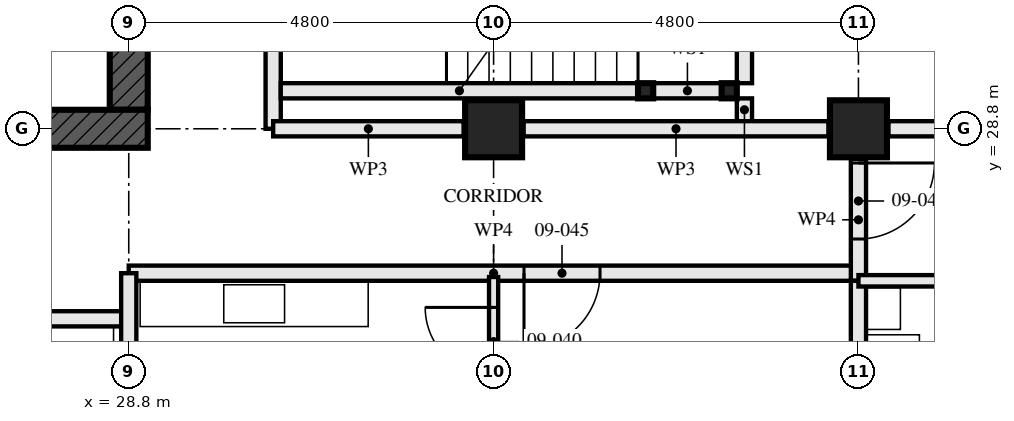
"""IFC4 building model, lengths in metres.
Left out: names, types, materials, properties, quantities, classifications, styles, units other than length and angle.
Written with IfcOpenShell. Run it as: python <this file> out.ifc"""

import sys

from ifc_helpers import new_model, si_unit, direction, frame, frame_2d, origin, origin_2d, place, context, subcontext, project, spatial, rectangle, hollow_rectangle, extrude, element, fill, save


model = new_model("IFC4")
c1 = context("Model", 3, precision=1e-05, world=origin(), true_north=direction((0.0, 1.0)))
c2 = subcontext(c1, "Body", "Model", "MODEL_VIEW")
j1 = project(units=[si_unit("LENGTHUNIT", "METRE"), si_unit("PLANEANGLEUNIT", "RADIAN")], contexts=[c1])
p1 = place(None, origin())
s1 = spatial("IfcSite", under=j1, at=p1, CompositionType="ELEMENT")
p2 = place(p1, origin())
s2 = spatial("IfcBuilding", under=s1, at=p2, CompositionType="ELEMENT")
p3 = place(p2, frame((0.0, 0.0, 37.5)))
s3 = spatial("IfcBuildingStorey", under=s2, at=p3, CompositionType="ELEMENT", Elevation=37.5)
for number, where, z_axis, x_axis in (
    (1, (33.6, 28.8, 0.0), (0.0, 0.0, 1.0), (0.0, 1.0, 0.0)),
    (2, (38.4, 28.8, 0.0), (0.0, 0.0, 1.0), (0.0, 1.0, 0.0)),
):
    element("IfcColumn", number, at=place(p3, frame(where, z_axis=z_axis, x_axis=x_axis)), inside=s3, PredefinedType="COLUMN", context=c2, shape_type="SweptSolid", body=[
        extrude(hollow_rectangle(XDim=0.75, YDim=0.75, WallThickness=0.08, at=origin_2d()), origin(), (0.0, 0.0, 1.0), 3.5),
    ])
p4 = place(p3, frame((14.15, 28.8, -0.17), z_axis=(0.0, 0.0, 1.0), x_axis=(1.0, 0.0, 0.0)))
e3 = element("IfcWall", 3, at=p4, inside=s3, PredefinedType="SHEAR", context=c2, shape_type="SweptSolid", body=[
    extrude(rectangle(XDim=14.9, YDim=0.5, at=frame_2d((7.45, 0.0))), origin(), (0.0, 0.0, 1.0), 3.5),
])
p5 = place(p4, frame((6.85, 0.0, 0.17)))
e4 = element("IfcOpeningElement", 4, at=p5, cuts=e3, PredefinedType="OPENING", context=c2, shape_type="SweptSolid", body=[
    extrude(rectangle(XDim=1.2, YDim=2.1, at=frame_2d((0.6, 1.05))), frame((0.0, 0.26, 0.0), z_axis=(0.0, -1.0, 0.0), x_axis=(1.0, 0.0, 0.0)), (0.0, 0.0, 1.0), 0.521),
])
p6 = place(p3, frame((28.8, 29.05, -0.17), z_axis=(0.0, 0.0, 1.0), x_axis=(0.0, 1.0, 0.0)))
e5 = element("IfcWall", 5, at=p6, inside=s3, PredefinedType="SHEAR", context=c2, shape_type="SweptSolid", body=[
    extrude(rectangle(XDim=13.9, YDim=0.5, at=frame_2d((6.95, 0.0))), origin(), (0.0, 0.0, 1.0), 3.5),
])
p7 = place(p6, frame((6.35, 0.0, 0.17)))
e6 = element("IfcOpeningElement", 6, at=p7, cuts=e5, PredefinedType="OPENING", context=c2, shape_type="SweptSolid", body=[
    extrude(rectangle(XDim=1.2, YDim=2.1, at=frame_2d((0.6, 1.05))), frame((0.0, 0.26, 0.0), z_axis=(0.0, -1.0, 0.0), x_axis=(1.0, 0.0, 0.0)), (0.0, 0.0, 1.0), 0.521),
])
for number, where, z_axis, x_axis in (
    (7, (36.7, 29.3, 0.0), (0.0, 0.0, 1.0), (1.0, 0.0, 0.0)),
    (8, (35.6, 29.3, 0.0), (0.0, 0.0, 1.0), (1.0, 0.0, 0.0)),
):
    element("IfcColumn", number, at=place(p3, frame(where, z_axis=z_axis, x_axis=x_axis)), inside=s3, PredefinedType="COLUMN", context=c2, shape_type="SweptSolid", body=[
        extrude(hollow_rectangle(XDim=0.2, YDim=0.2, WallThickness=0.008, at=origin_2d()), origin(), (0.0, 0.0, 1.0), 3.33),
    ])
p8 = place(p3, frame((17.8, 26.3, 0.0), z_axis=(0.0, 0.0, 1.0), x_axis=(1.0, 0.0, 0.0)))
e9 = element("IfcWall", 9, at=p8, inside=s3, PredefinedType="PARTITIONING", context=c2, shape_type="SweptSolid", body=[
    extrude(rectangle(XDim=11.0, YDim=0.2, at=frame_2d((5.5, 0.0))), origin(), (0.0, 0.0, 1.0), 2.55),
])
p9 = place(p8, frame((1.8, 0.0, 0.0)))
e10 = element("IfcOpeningElement", 10, at=p9, cuts=e9, PredefinedType="OPENING", context=c2, shape_type="SweptSolid", body=[
    extrude(rectangle(XDim=1.0, YDim=2.1, at=frame_2d((0.5, 1.05))), frame((0.0, 0.111, 0.0), z_axis=(0.0, -1.0, 0.0), x_axis=(1.0, 0.0, 0.0)), (0.0, 0.0, 1.0), 0.221),
])
p10 = place(p8, frame((6.6, 0.0, 0.0)))
e11 = element("IfcOpeningElement", 11, at=p10, cuts=e9, PredefinedType="OPENING", context=c2, shape_type="SweptSolid", body=[
    extrude(rectangle(XDim=1.0, YDim=2.1, at=frame_2d((0.5, 1.05))), frame((0.0, 0.111, 0.0), z_axis=(0.0, -1.0, 0.0), x_axis=(1.0, 0.0, 0.0)), (0.0, 0.0, 1.0), 0.221),
])
p11 = place(p3, frame((33.6, 22.2, 0.0), z_axis=(0.0, 0.0, 1.0), x_axis=(0.0, 1.0, 0.0)))
e12 = element("IfcWall", 12, at=p11, inside=s3, PredefinedType="PARTITIONING", context=c2, shape_type="SweptSolid", body=[
    extrude(rectangle(XDim=4.65, YDim=0.12, at=frame_2d((2.325, 0.0))), origin(), (0.0, 0.0, 1.0), 2.55),
])
p12 = place(p11, frame((3.35, 0.0, 0.0)))
e13 = element("IfcOpeningElement", 13, at=p12, cuts=e12, PredefinedType="OPENING", context=c2, shape_type="SweptSolid", body=[
    extrude(rectangle(XDim=0.9, YDim=2.1, at=frame_2d((0.45, 1.05))), frame((0.0, 0.071, 0.0), z_axis=(0.0, -1.0, 0.0), x_axis=(1.0, 0.0, 0.0)), (0.0, 0.0, 1.0), 0.141),
])
p13 = place(p3, frame((38.4, 19.52, 0.0), z_axis=(0.0, 0.0, 1.0), x_axis=(0.0, 1.0, 0.0)))
e14 = element("IfcWall", 14, at=p13, inside=s3, PredefinedType="PARTITIONING", context=c2, shape_type="SweptSolid", body=[
    extrude(rectangle(XDim=7.28, YDim=0.2, at=frame_2d((3.64, 0.0))), origin(), (0.0, 0.0, 1.0), 2.55),
])
p14 = place(p3, frame((38.4, 26.8, 0.0), z_axis=(0.0, 0.0, 1.0), x_axis=(1.0, 0.0, 0.0)))
e15 = element("IfcWall", 15, at=p14, inside=s3, PredefinedType="PARTITIONING", context=c2, shape_type="SweptSolid", body=[
    extrude(rectangle(XDim=2.8, YDim=0.15, at=frame_2d((1.4, 0.0))), origin(), (0.0, 0.0, 1.0), 3.33),
])
p15 = place(p3, frame((28.8, 26.9, 0.0), z_axis=(0.0, 0.0, 1.0), x_axis=(1.0, 0.0, 0.0)))
e16 = element("IfcWall", 16, at=p15, inside=s3, PredefinedType="PARTITIONING", context=c2, shape_type="SweptSolid", body=[
    extrude(rectangle(XDim=9.6, YDim=0.2, at=frame_2d((4.8, 0.0))), origin(), (0.0, 0.0, 1.0), 3.33),
])
p16 = place(p15, frame((5.2, 0.0, 0.0)))
e17 = element("IfcOpeningElement", 17, at=p16, cuts=e16, PredefinedType="OPENING", context=c2, shape_type="SweptSolid", body=[
    extrude(rectangle(XDim=1.0, YDim=2.1, at=frame_2d((0.5, 1.05))), frame((0.0, 0.111, 0.0), z_axis=(0.0, -1.0, 0.0), x_axis=(1.0, 0.0, 0.0)), (0.0, 0.0, 1.0), 0.221),
])
p17 = place(p3, frame((38.4, 26.8, 0.0), z_axis=(0.0, 0.0, 1.0), x_axis=(0.0, 1.0, 0.0)))
e18 = element("IfcWall", 18, at=p17, inside=s3, PredefinedType="PARTITIONING", context=c2, shape_type="SweptSolid", body=[
    extrude(rectangle(XDim=1.605, YDim=0.2, at=frame_2d((0.802, 0.0))), origin(), (0.0, 0.0, 1.0), 3.33),
])
p18 = place(p17, frame((0.55, 0.0, 0.0)))
e19 = element("IfcOpeningElement", 19, at=p18, cuts=e18, PredefinedType="OPENING", context=c2, shape_type="SweptSolid", body=[
    extrude(rectangle(XDim=1.0, YDim=2.1, at=frame_2d((0.5, 1.05))), frame((0.0, 0.111, 0.0), z_axis=(0.0, -1.0, 0.0), x_axis=(1.0, 0.0, 0.0)), (0.0, 0.0, 1.0), 0.221),
])
p19 = place(p3, frame((36.6, 29.3, 0.0), z_axis=(0.0, 0.0, 1.0), x_axis=(-1.0, 0.0, 0.0)))
e20 = element("IfcWall", 20, at=p19, inside=s3, PredefinedType="SOLIDWALL", context=c2, shape_type="SweptSolid", body=[
    extrude(rectangle(XDim=0.9, YDim=0.2, at=frame_2d((0.45, 0.0))), origin(), (0.0, 0.0, 1.0), 2.99),
])
p20 = place(p3, frame((35.5, 29.3, 0.0), z_axis=(0.0, 0.0, 1.0), x_axis=(-1.0, 0.0, 0.0)))
e21 = element("IfcWall", 21, at=p20, inside=s3, PredefinedType="SOLIDWALL", context=c2, shape_type="SweptSolid", body=[
    extrude(rectangle(XDim=4.7, YDim=0.2, at=frame_2d((2.35, 0.0))), origin(), (0.0, 0.0, 1.0), 2.99),
])
p21 = place(p3, frame((36.9, 28.9, 0.0), z_axis=(0.0, 0.0, 1.0), x_axis=(0.0, 1.0, 0.0)))
e22 = element("IfcWall", 22, at=p21, inside=s3, PredefinedType="SOLIDWALL", context=c2, shape_type="SweptSolid", body=[
    extrude(rectangle(XDim=0.3, YDim=0.2, at=frame_2d((0.15, 0.0))), origin(), (0.0, 0.0, 1.0), 3.33),
])
p22 = place(p3, frame((36.9, 29.4, 0.0), z_axis=(0.0, 0.0, 1.0), x_axis=(0.0, 1.0, 0.0)))
e23 = element("IfcWall", 23, at=p22, inside=s3, PredefinedType="SOLIDWALL", context=c2, shape_type="SweptSolid", body=[
    extrude(rectangle(XDim=2.6, YDim=0.2, at=frame_2d((1.3, 0.0))), origin(), (0.0, 0.0, 1.0), 3.33),
])
p23 = place(p3, frame((30.7, 28.8, 0.0), z_axis=(0.0, 0.0, 1.0), x_axis=(0.0, 1.0, 0.0)))
e24 = element("IfcWall", 24, at=p23, inside=s3, PredefinedType="PARTITIONING", context=c2, shape_type="SweptSolid", body=[
    extrude(rectangle(XDim=14.4, YDim=0.2, at=frame_2d((7.2, 0.0))), origin(), (0.0, 0.0, 1.0), 2.55),
])
p24 = place(p23, frame((1.4, 0.0, 0.0)))
e25 = element("IfcOpeningElement", 25, at=p24, cuts=e24, PredefinedType="OPENING", context=c2, shape_type="SweptSolid", body=[
    extrude(rectangle(XDim=1.0, YDim=2.1, at=frame_2d((0.5, 1.05))), frame((0.0, 0.111, 0.0), z_axis=(0.0, -1.0, 0.0), x_axis=(1.0, 0.0, 0.0)), (0.0, 0.0, 1.0), 0.221),
])
p25 = place(p23, frame((4.1, 0.0, 0.0)))
e26 = element("IfcOpeningElement", 26, at=p25, cuts=e24, PredefinedType="OPENING", context=c2, shape_type="SweptSolid", body=[
    extrude(rectangle(XDim=1.0, YDim=2.1, at=frame_2d((0.5, 1.05))), frame((0.0, 0.111, 0.0), z_axis=(0.0, -1.0, 0.0), x_axis=(1.0, 0.0, 0.0)), (0.0, 0.0, 1.0), 0.221),
])
p26 = place(p23, frame((5.975, 0.0, 0.0)))
e27 = element("IfcOpeningElement", 27, at=p26, cuts=e24, PredefinedType="OPENING", context=c2, shape_type="SweptSolid", body=[
    extrude(rectangle(XDim=1.0, YDim=2.1, at=frame_2d((0.5, 1.05))), frame((0.0, 0.111, 0.0), z_axis=(0.0, -1.0, 0.0), x_axis=(1.0, 0.0, 0.0)), (0.0, 0.0, 1.0), 0.221),
])
p27 = place(p23, frame((10.0, 0.0, 0.0)))
e28 = element("IfcOpeningElement", 28, at=p27, cuts=e24, PredefinedType="OPENING", context=c2, shape_type="SweptSolid", body=[
    extrude(rectangle(XDim=1.0, YDim=2.1, at=frame_2d((0.5, 1.05))), frame((0.0, 0.111, 0.0), z_axis=(0.0, -1.0, 0.0), x_axis=(1.0, 0.0, 0.0)), (0.0, 0.0, 1.0), 0.221),
])
p28 = place(p3, frame((28.8, 24.395, 0.0), z_axis=(0.0, 0.0, 1.0), x_axis=(0.0, 1.0, 0.0)))
e29 = element("IfcWall", 29, at=p28, inside=s3, PredefinedType="PARTITIONING", context=c2, shape_type="SweptSolid", body=[
    extrude(rectangle(XDim=2.505, YDim=0.2, at=frame_2d((1.252, 0.0))), origin(), (0.0, 0.0, 1.0), 2.32),
])
p29 = place(p3, frame((42.88, 28.8, 0.0), z_axis=(0.0, 0.0, 1.0), x_axis=(-1.0, 0.0, 0.0)))
e30 = element("IfcWall", 30, at=p29, inside=s3, PredefinedType="PARTITIONING", context=c2, shape_type="SweptSolid", body=[
    extrude(rectangle(XDim=4.085, YDim=0.2, at=frame_2d((2.042, 0.0))), origin(), (0.0, 0.0, 1.0), 2.32),
])
p30 = place(p3, frame((38.005, 28.8, 0.0), z_axis=(0.0, 0.0, 1.0), x_axis=(-1.0, 0.0, 0.0)))
e31 = element("IfcWall", 31, at=p30, inside=s3, PredefinedType="PARTITIONING", context=c2, shape_type="SweptSolid", body=[
    extrude(rectangle(XDim=4.01, YDim=0.2, at=frame_2d((2.005, 0.0))), origin(), (0.0, 0.0, 1.0), 2.32),
])
p31 = place(p3, frame((33.205, 28.8, 0.0), z_axis=(0.0, 0.0, 1.0), x_axis=(-1.0, 0.0, 0.0)))
e32 = element("IfcWall", 32, at=p31, inside=s3, PredefinedType="PARTITIONING", context=c2, shape_type="SweptSolid", body=[
    extrude(rectangle(XDim=2.505, YDim=0.2, at=frame_2d((1.252, 0.0))), origin(), (0.0, 0.0, 1.0), 2.32),
])
p32 = place(p12, origin())
e33 = element("IfcDoor", 33, at=p32, inside=s3, OperationType="SINGLE_SWING_LEFT", PredefinedType="DOOR", context=c2, shape_type="SweptSolid", body=[
    extrude(rectangle(XDim=0.9, YDim=2.1, at=frame_2d((0.45, 1.05))), frame((0.0, 0.022, 0.0), z_axis=(0.0, -1.0, 0.0), x_axis=(1.0, 0.0, 0.0)), (0.0, 0.0, 1.0), 0.044),
])
fill(e13, e33)
p33 = place(p16, frame((1.0, 0.0, 0.0), z_axis=(0.0, 0.0, 1.0), x_axis=(-1.0, 0.0, 0.0)))
e34 = element("IfcDoor", 34, at=p33, inside=s3, OperationType="SINGLE_SWING_LEFT", PredefinedType="DOOR", context=c2, shape_type="SweptSolid", body=[
    extrude(rectangle(XDim=1.0, YDim=2.1, at=frame_2d((0.5, 1.05))), frame((0.0, 0.027, 0.0), z_axis=(0.0, -1.0, 0.0), x_axis=(1.0, 0.0, 0.0)), (0.0, 0.0, 1.0), 0.054),
])
fill(e17, e34)
p34 = place(p18, frame((1.0, 0.0, 0.0), z_axis=(0.0, 0.0, 1.0), x_axis=(-1.0, 0.0, 0.0)))
e35 = element("IfcDoor", 35, at=p34, inside=s3, OperationType="SINGLE_SWING_RIGHT", PredefinedType="DOOR", context=c2, shape_type="SweptSolid", body=[
    extrude(rectangle(XDim=1.0, YDim=2.1, at=frame_2d((0.5, 1.05))), frame((0.0, 0.027, 0.0), z_axis=(0.0, -1.0, 0.0), x_axis=(1.0, 0.0, 0.0)), (0.0, 0.0, 1.0), 0.054),
])
fill(e19, e35)
save(model, sys.argv[1])
